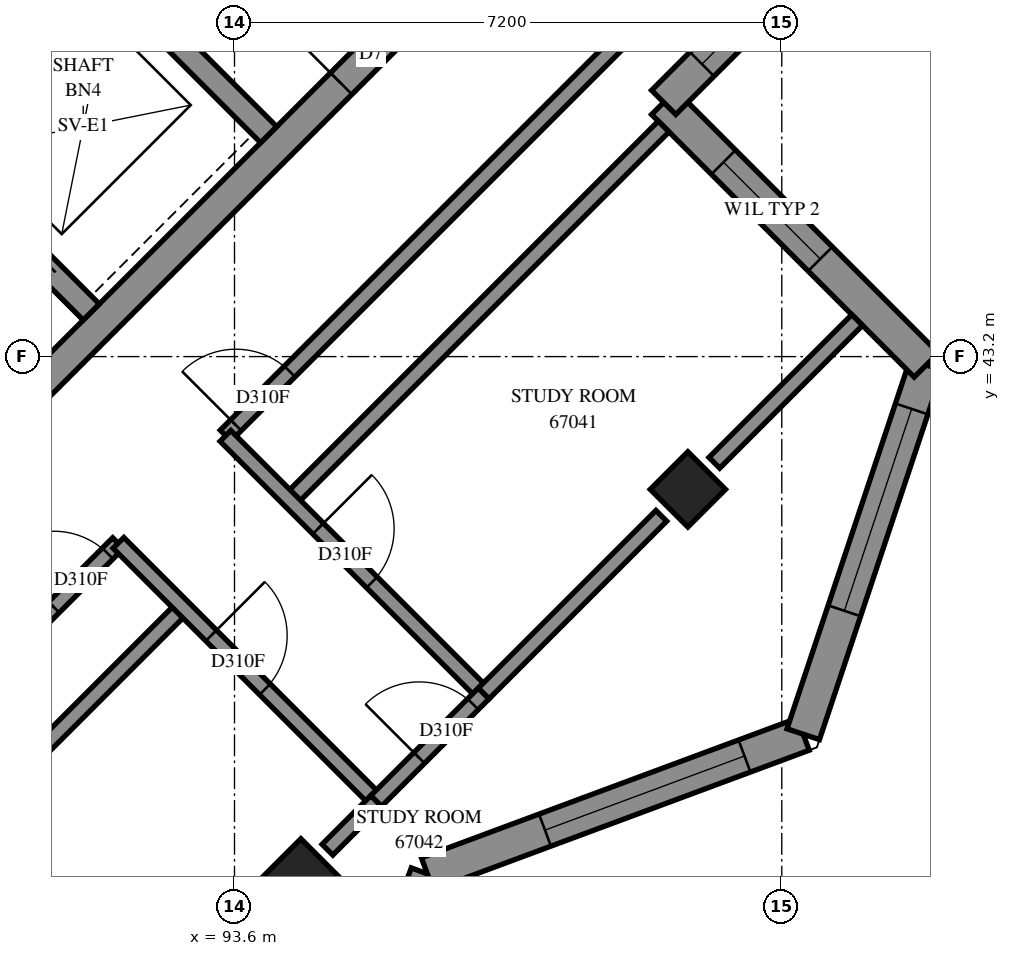
"""IFC4 building model, lengths in metres.
Left out: names, types, materials, properties, quantities, classifications, styles, units other than length and angle.
Written with IfcOpenShell. Run it as: python <this file> out.ifc"""

import sys

from ifc_helpers import new_model, si_unit, direction, frame, frame_2d, origin, origin_2d, place, context, subcontext, project, spatial, polyline, rectangle, outline, extrude, element, fill, save


model = new_model("IFC4")
c1 = context("Model", 3, precision=1e-05, world=origin(), true_north=direction((0.0, 1.0)))
c2 = subcontext(c1, "Body", "Model", "MODEL_VIEW")
j1 = project(units=[si_unit("LENGTHUNIT", "METRE"), si_unit("PLANEANGLEUNIT", "RADIAN")], contexts=[c1])
p1 = place(None, origin())
s1 = spatial("IfcSite", under=j1, at=p1, CompositionType="ELEMENT")
p2 = place(p1, origin())
s2 = spatial("IfcBuilding", under=s1, at=p2, CompositionType="ELEMENT")
p3 = place(p2, frame((0.0, 0.0, 247.2)))
s3 = spatial("IfcBuildingStorey", under=s2, at=p3, CompositionType="ELEMENT", Elevation=247.2)
for number, where, z_axis, x_axis in (
    (1, (99.565, 41.453, 0.0), (0.0, 0.0, 1.0), (0.707, -0.707, 0.0)),
    (2, (94.474, 36.362, 0.0), (0.0, 0.0, 1.0), (0.707, -0.707, 0.0)),
):
    element("IfcColumn", number, at=place(p3, frame(where, z_axis=z_axis, x_axis=x_axis)), inside=s3, PredefinedType="COLUMN", context=c2, shape_type="SweptSolid", body=[
        extrude(rectangle(XDim=0.7, YDim=0.7, at=origin_2d()), origin(), (0.0, 0.0, 1.0), 3.1),
    ])
p4 = place(p3, frame((86.978, 38.766, -0.3), z_axis=(0.0, 0.0, 1.0), x_axis=(0.7071067812, 0.7071067812, 0.0)))
e3 = element("IfcWall", 3, at=p4, inside=s3, PredefinedType="SHEAR", context=c2, shape_type="SweptSolid", body=[
    extrude(rectangle(XDim=14.4, YDim=0.4, at=frame_2d((7.2, 0.0))), origin(), (0.0, 0.0, 1.0), 2.7),
])
p5 = place(p4, frame((4.55, 0.0, 0.3)))
e4 = element("IfcOpeningElement", 4, at=p5, cuts=e3, PredefinedType="OPENING", context=c2, shape_type="SweptSolid", body=[
    extrude(rectangle(XDim=1.1, YDim=2.1, at=frame_2d((0.55, 1.05))), frame((0.0, 0.21, 0.0), z_axis=(0.0, -1.0, 0.0), x_axis=(1.0, 0.0, 0.0)), (0.0, 0.0, 1.0), 0.42),
])
p6 = place(p4, frame((11.35, 0.0, 0.3)))
e5 = element("IfcOpeningElement", 5, at=p6, cuts=e3, PredefinedType="OPENING", context=c2, shape_type="SweptSolid", body=[
    extrude(rectangle(XDim=1.1, YDim=2.1, at=frame_2d((0.55, 1.05))), frame((0.0, 0.21, 0.0), z_axis=(0.0, -1.0, 0.0), x_axis=(1.0, 0.0, 0.0)), (0.0, 0.0, 1.0), 0.42),
])
p7 = place(p3, frame((89.17, 46.332, 0.0), z_axis=(0.0, 0.0, 1.0), x_axis=(0.7071067812, 0.7071067812, 0.0)))
e6 = element("IfcWall", 6, at=p7, inside=s3, PredefinedType="SOLIDWALL", context=c2, shape_type="SweptSolid", body=[
    extrude(rectangle(XDim=3.3, YDim=0.3, at=frame_2d((1.65, 0.0))), origin(), (0.0, 0.0, 1.0), 3.1),
])
p8 = place(p3, frame((81.534, 53.969, 0.0), z_axis=(0.0, 0.0, 1.0), x_axis=(0.707103309, -0.7071102534, 0.0)))
e7 = element("IfcWall", 7, at=p8, inside=s3, PredefinedType="SOLIDWALL", context=c2, shape_type="SweptSolid", body=[
    extrude(rectangle(XDim=14.4, YDim=0.3, at=frame_2d((7.2, 0.0))), origin(), (0.0, 0.0, 1.0), 3.1),
])
p9 = place(p8, frame((8.55, 0.0, 0.0)))
e8 = element("IfcOpeningElement", 8, at=p9, cuts=e7, PredefinedType="OPENING", context=c2, shape_type="SweptSolid", body=[
    extrude(rectangle(XDim=0.9, YDim=2.1, at=frame_2d((0.45, 1.05))), frame((0.0, 0.16, 0.0), z_axis=(0.0, -1.0, 0.0), x_axis=(1.0, 0.0, 0.0)), (0.0, 0.0, 1.0), 0.32),
])
p10 = place(p8, frame((1.25, 0.0, 0.0)))
e9 = element("IfcOpeningElement", 9, at=p10, cuts=e7, PredefinedType="OPENING", context=c2, shape_type="SweptSolid", body=[
    extrude(rectangle(XDim=1.1, YDim=2.1, at=frame_2d((0.55, 1.05))), frame((0.0, 0.16, 0.0), z_axis=(0.0, -1.0, 0.0), x_axis=(1.0, 0.0, 0.0)), (0.0, 0.0, 1.0), 0.32),
])
p11 = place(p8, frame((4.85, 0.0, 0.0)))
e10 = element("IfcOpeningElement", 10, at=p11, cuts=e7, PredefinedType="OPENING", context=c2, shape_type="SweptSolid", body=[
    extrude(rectangle(XDim=1.1, YDim=2.1, at=frame_2d((0.55, 1.05))), frame((0.0, 0.16, 0.0), z_axis=(0.0, -1.0, 0.0), x_axis=(1.0, 0.0, 0.0)), (0.0, 0.0, 1.0), 0.32),
])
p12 = place(p8, frame((12.05, 0.0, 0.0)))
e11 = element("IfcOpeningElement", 11, at=p12, cuts=e7, PredefinedType="OPENING", context=c2, shape_type="SweptSolid", body=[
    extrude(rectangle(XDim=1.1, YDim=2.1, at=frame_2d((0.55, 1.05))), frame((0.0, 0.16, 0.0), z_axis=(0.0, -1.0, 0.0), x_axis=(1.0, 0.0, 0.0)), (0.0, 0.0, 1.0), 0.32),
])
p13 = place(p3, frame((88.958, 51.211, 0.0), z_axis=(0.0, 0.0, 1.0), x_axis=(0.7070998367, -0.7071137256, 0.0)))
e12 = element("IfcWall", 12, at=p13, inside=s3, PredefinedType="SOLIDWALL", context=c2, shape_type="SweptSolid", body=[
    extrude(rectangle(XDim=7.2, YDim=0.3, at=frame_2d((3.6, 0.0))), origin(), (0.0, 0.0, 1.0), 3.1),
])
p14 = place(p3, frame((94.3, 31.45, 0.0), z_axis=(0.0, 0.0, 1.0), x_axis=(0.3481927166, 0.9374229739, 0.0)))
e13 = element("IfcWall", 13, at=p14, inside=s3, PredefinedType="SOLIDWALL", context=c2, shape_type="SweptSolid", body=[
    extrude(outline(polyline([(-0.108, -0.225), (5.172, -0.225), (5.379, 0.225), (0.108, 0.225), (-0.108, -0.225)])), origin(), (0.0, 0.0, 1.0), 3.1),
])
p15 = place(p14, frame((1.534, 0.0, 0.45)))
e14 = element("IfcOpeningElement", 14, at=p15, cuts=e13, PredefinedType="OPENING", context=c2, shape_type="SweptSolid", body=[
    extrude(rectangle(XDim=2.8, YDim=2.55, at=frame_2d((1.4, 1.275))), frame((0.0, 0.235, 0.0), z_axis=(0.0, -1.0, 0.0), x_axis=(1.0, 0.0, 0.0)), (0.0, 0.0, 1.0), 0.47),
])
p16 = place(p3, frame((96.137, 36.395, 0.0), z_axis=(0.0, 0.0, 1.0), x_axis=(0.937429161, 0.3481760591, 0.0)))
e15 = element("IfcWall", 15, at=p16, inside=s3, PredefinedType="SOLIDWALL", context=c2, shape_type="SweptSolid", body=[
    extrude(outline(polyline([(0.103, -0.225), (5.383, -0.225), (5.168, 0.225), (-0.103, 0.225), (0.103, -0.225)])), origin(), (0.0, 0.0, 1.0), 3.1),
])
p17 = place(p16, frame((1.651, 0.0, 0.45)))
e16 = element("IfcOpeningElement", 16, at=p17, cuts=e15, PredefinedType="OPENING", context=c2, shape_type="SweptSolid", body=[
    extrude(rectangle(XDim=2.8, YDim=2.55, at=frame_2d((1.4, 1.275))), frame((0.0, 0.235, 0.0), z_axis=(0.0, -1.0, 0.0), x_axis=(1.0, 0.0, 0.0)), (0.0, 0.0, 1.0), 0.47),
])
p18 = place(p3, frame((101.082, 38.232, 0.0), z_axis=(0.0, 0.0, 1.0), x_axis=(0.316227766, 0.9486832981, 0.0)))
e17 = element("IfcWall", 17, at=p18, inside=s3, PredefinedType="SOLIDWALL", context=c2, shape_type="SweptSolid", body=[
    extrude(outline(polyline([(-0.108, -0.225), (5.259, -0.225), (4.981, 0.225), (0.108, 0.225), (-0.108, -0.225)])), origin(), (0.0, 0.0, 1.0), 3.1),
])
p19 = place(p18, frame((1.711, 0.0, 0.45)))
e18 = element("IfcOpeningElement", 18, at=p19, cuts=e17, PredefinedType="OPENING", context=c2, shape_type="SweptSolid", body=[
    extrude(rectangle(XDim=2.8, YDim=2.55, at=frame_2d((1.4, 1.275))), frame((0.0, 0.235, 0.0), z_axis=(0.0, -1.0, 0.0), x_axis=(1.0, 0.0, 0.0)), (0.0, 0.0, 1.0), 0.47),
])
p20 = place(p3, frame((102.701, 43.089, 0.0), z_axis=(0.0, 0.0, 1.0), x_axis=(-0.7070965479, 0.7071170144, 0.0)))
e19 = element("IfcWall", 19, at=p20, inside=s3, PredefinedType="SOLIDWALL", context=c2, shape_type="SweptSolid", body=[
    extrude(outline(polyline([(-0.139, -0.225), (4.661, -0.225), (5.111, 0.225), (0.139, 0.225), (-0.139, -0.225)])), origin(), (0.0, 0.0, 1.0), 3.1),
])
p21 = place(p20, frame((1.974, 0.0, 0.6)))
e20 = element("IfcOpeningElement", 20, at=p21, cuts=e19, PredefinedType="OPENING", context=c2, shape_type="SweptSolid", body=[
    extrude(rectangle(XDim=1.8, YDim=1.9, at=frame_2d((0.9, 0.95))), frame((0.0, 0.235, 0.0), z_axis=(0.0, -1.0, 0.0), x_axis=(1.0, 0.0, 0.0)), (0.0, 0.0, 1.0), 0.47),
])
p22 = place(p3, frame((99.246, 46.544, 0.0), z_axis=(0.0, 0.0, 1.0), x_axis=(0.7071067812, 0.7071067812, 0.0)))
e21 = element("IfcWall", 21, at=p22, inside=s3, PredefinedType="SOLIDWALL", context=c2, shape_type="SweptSolid", body=[
    extrude(outline(polyline([(0.225, -0.225), (5.955, -0.225), (5.362, 0.225), (-0.225, 0.225), (0.225, -0.225)])), origin(), (0.0, 0.0, 1.0), 3.1),
])
p23 = place(p22, frame((0.713, 0.0, 0.6)))
e22 = element("IfcOpeningElement", 22, at=p23, cuts=e21, PredefinedType="OPENING", context=c2, shape_type="SweptSolid", body=[
    extrude(rectangle(XDim=1.8, YDim=1.9, at=frame_2d((0.9, 0.95))), frame((0.0, 0.235, 0.0), z_axis=(0.0, -1.0, 0.0), x_axis=(1.0, 0.0, 0.0)), (0.0, 0.0, 1.0), 0.47),
])
p24 = place(p3, frame((84.934, 31.915, 0.0), z_axis=(0.0, 0.0, 1.0), x_axis=(0.7071067812, 0.7071067812, 0.0)))
e23 = element("IfcWall", 23, at=p24, inside=s3, PredefinedType="PARTITIONING", context=c2, shape_type="SweptSolid", body=[
    extrude(rectangle(XDim=11.29, YDim=0.2, at=frame_2d((5.645, 0.0))), origin(), (0.0, 0.0, 1.0), 3.1),
])
p25 = place(p3, frame((93.483, 42.161, 0.0), z_axis=(0.0, 0.0, 1.0), x_axis=(0.7071067812, 0.7071067812, 0.0)))
e24 = element("IfcWall", 24, at=p25, inside=s3, PredefinedType="PARTITIONING", context=c2, shape_type="SweptSolid", body=[
    extrude(rectangle(XDim=9.8, YDim=0.2, at=frame_2d((4.9, 0.0))), origin(), (0.0, 0.0, 1.0), 3.1),
])
p26 = place(p25, frame((0.193, 0.0, 0.0)))
e25 = element("IfcOpeningElement", 25, at=p26, cuts=e24, PredefinedType="OPENING", context=c2, shape_type="SweptSolid", body=[
    extrude(rectangle(XDim=1.0, YDim=2.1, at=frame_2d((0.5, 1.05))), frame((0.0, 0.11, 0.0), z_axis=(0.0, -1.0, 0.0), x_axis=(1.0, 0.0, 0.0)), (0.0, 0.0, 1.0), 0.22),
])
p27 = place(p3, frame((86.836, 35.514, 0.0), z_axis=(0.0, 0.0, 1.0), x_axis=(0.7071067812, 0.7071067812, 0.0)))
e26 = element("IfcWall", 26, at=p27, inside=s3, PredefinedType="PARTITIONING", context=c2, shape_type="SweptSolid", body=[
    extrude(rectangle(XDim=7.399, YDim=0.2, at=frame_2d((3.7, 0.0))), origin(), (0.0, 0.0, 1.0), 3.1),
])
p28 = place(p27, frame((6.207, 0.0, 0.0)))
e27 = element("IfcOpeningElement", 27, at=p28, cuts=e26, PredefinedType="OPENING", context=c2, shape_type="SweptSolid", body=[
    extrude(rectangle(XDim=1.0, YDim=2.1, at=frame_2d((0.5, 1.05))), frame((0.0, 0.11, 0.0), z_axis=(0.0, -1.0, 0.0), x_axis=(1.0, 0.0, 0.0)), (0.0, 0.0, 1.0), 0.22),
])
p29 = place(p3, frame((94.331, 41.313, 0.0), z_axis=(0.0, 0.0, 1.0), x_axis=(0.7071139756, 0.7070995867, 0.0)))
e28 = element("IfcWall", 28, at=p29, inside=s3, PredefinedType="PARTITIONING", context=c2, shape_type="SweptSolid", body=[
    extrude(rectangle(XDim=6.95, YDim=0.2, at=frame_2d((3.475, 0.0))), origin(), (0.0, 0.0, 1.0), 3.1),
])
p30 = place(p3, frame((93.481, 42.157, 0.0), z_axis=(0.0, 0.0, 1.0), x_axis=(0.7071067812, -0.7071067812, 0.0)))
e29 = element("IfcWall", 29, at=p30, inside=s3, PredefinedType="PARTITIONING", context=c2, shape_type="SweptSolid", body=[
    extrude(rectangle(XDim=4.8, YDim=0.2, at=frame_2d((2.4, 0.0))), origin(), (0.0, 0.0, 1.0), 3.1),
])
p31 = place(p30, frame((1.725, 0.0, 0.0)))
e30 = element("IfcOpeningElement", 30, at=p31, cuts=e29, PredefinedType="OPENING", context=c2, shape_type="SweptSolid", body=[
    extrude(rectangle(XDim=1.0, YDim=2.1, at=frame_2d((0.5, 1.05))), frame((0.0, 0.11, 0.0), z_axis=(0.0, -1.0, 0.0), x_axis=(1.0, 0.0, 0.0)), (0.0, 0.0, 1.0), 0.22),
])
p32 = place(p3, frame((92.073, 40.749, 0.0), z_axis=(0.0, 0.0, 1.0), x_axis=(0.7071067812, -0.7071067812, 0.0)))
e31 = element("IfcWall", 31, at=p32, inside=s3, PredefinedType="PARTITIONING", context=c2, shape_type="SweptSolid", body=[
    extrude(rectangle(XDim=4.8, YDim=0.2, at=frame_2d((2.4, 0.0))), origin(), (0.0, 0.0, 1.0), 3.1),
])
p33 = place(p32, frame((1.725, 0.0, 0.0)))
e32 = element("IfcOpeningElement", 32, at=p33, cuts=e31, PredefinedType="OPENING", context=c2, shape_type="SweptSolid", body=[
    extrude(rectangle(XDim=1.0, YDim=2.1, at=frame_2d((0.5, 1.05))), frame((0.0, 0.11, 0.0), z_axis=(0.0, -1.0, 0.0), x_axis=(1.0, 0.0, 0.0)), (0.0, 0.0, 1.0), 0.22),
])
p34 = place(p3, frame((96.877, 38.767, 0.0), z_axis=(0.0, 0.0, 1.0), x_axis=(0.7071067812, 0.7071067812, 0.0)))
e33 = element("IfcWall", 33, at=p34, inside=s3, PredefinedType="PARTITIONING", context=c2, shape_type="SweptSolid", body=[
    extrude(rectangle(XDim=3.306, YDim=0.2, at=frame_2d((1.653, 0.0))), origin(), (0.0, 0.0, 1.0), 2.6),
])
p35 = place(p3, frame((99.913, 41.803, 0.0), z_axis=(0.0, 0.0, 1.0), x_axis=(0.7071067812, 0.7071067812, 0.0)))
e34 = element("IfcWall", 34, at=p35, inside=s3, PredefinedType="PARTITIONING", context=c2, shape_type="SweptSolid", body=[
    extrude(rectangle(XDim=2.656, YDim=0.2, at=frame_2d((1.328, 0.0))), origin(), (0.0, 0.0, 1.0), 3.1),
])
p36 = place(p3, frame((95.463, 37.353, 0.0), z_axis=(0.0, 0.0, 1.0), x_axis=(0.7071067812, 0.7071067812, 0.0)))
e35 = element("IfcWall", 35, at=p36, inside=s3, PredefinedType="PARTITIONING", context=c2, shape_type="SweptSolid", body=[
    extrude(rectangle(XDim=2.0, YDim=0.2, at=frame_2d((1.0, 0.0))), origin(), (0.0, 0.0, 1.0), 2.6),
])
p37 = place(p36, frame((0.802, 0.0, 0.0)))
e36 = element("IfcOpeningElement", 36, at=p37, cuts=e35, PredefinedType="OPENING", context=c2, shape_type="SweptSolid", body=[
    extrude(rectangle(XDim=1.0, YDim=2.1, at=frame_2d((0.5, 1.05))), frame((0.0, 0.11, 0.0), z_axis=(0.0, -1.0, 0.0), x_axis=(1.0, 0.0, 0.0)), (0.0, 0.0, 1.0), 0.22),
])
p38 = place(p3, frame((94.823, 36.713, 0.0), z_axis=(0.0, 0.0, 1.0), x_axis=(0.7071067812, 0.7071067812, 0.0)))
e37 = element("IfcWall", 37, at=p38, inside=s3, PredefinedType="PARTITIONING", context=c2, shape_type="SweptSolid", body=[
    extrude(rectangle(XDim=0.905, YDim=0.2, at=frame_2d((0.453, 0.0))), origin(), (0.0, 0.0, 1.0), 2.6),
])
p39 = place(p17, origin())
e38 = element("IfcWindow", 38, at=p39, inside=s3, PartitioningType="SINGLE_PANEL", PredefinedType="WINDOW", context=c2, shape_type="SweptSolid", body=[
    extrude(rectangle(XDim=2.8, YDim=2.55, at=frame_2d((1.4, 1.275))), frame((0.0, 0.205, 0.0), z_axis=(0.0, -1.0, 0.0), x_axis=(1.0, 0.0, 0.0)), (0.0, 0.0, 1.0), 0.06),
])
fill(e16, e38)
p40 = place(p19, origin())
e39 = element("IfcWindow", 39, at=p40, inside=s3, PartitioningType="SINGLE_PANEL", PredefinedType="WINDOW", context=c2, shape_type="SweptSolid", body=[
    extrude(rectangle(XDim=2.8, YDim=2.55, at=frame_2d((1.4, 1.275))), frame((0.0, 0.205, 0.0), z_axis=(0.0, -1.0, 0.0), x_axis=(1.0, 0.0, 0.0)), (0.0, 0.0, 1.0), 0.06),
])
fill(e18, e39)
p41 = place(p21, origin())
e40 = element("IfcWindow", 40, at=p41, inside=s3, PartitioningType="SINGLE_PANEL", PredefinedType="WINDOW", context=c2, shape_type="SweptSolid", body=[
    extrude(rectangle(XDim=1.8, YDim=1.9, at=frame_2d((0.9, 0.95))), frame((0.0, 0.205, 0.0), z_axis=(0.0, -1.0, 0.0), x_axis=(1.0, 0.0, 0.0)), (0.0, 0.0, 1.0), 0.06),
])
fill(e20, e40)
p42 = place(p23, origin())
e41 = element("IfcWindow", 41, at=p42, inside=s3, PartitioningType="SINGLE_PANEL", PredefinedType="WINDOW", context=c2, shape_type="SweptSolid", body=[
    extrude(rectangle(XDim=1.8, YDim=1.9, at=frame_2d((0.9, 0.95))), frame((0.0, 0.205, 0.0), z_axis=(0.0, -1.0, 0.0), x_axis=(1.0, 0.0, 0.0)), (0.0, 0.0, 1.0), 0.06),
])
fill(e22, e41)
p43 = place(p6, origin())
e42 = element("IfcDoor", 42, at=p43, inside=s3, OperationType="SINGLE_SWING_RIGHT", PredefinedType="DOOR", context=c2, shape_type="SweptSolid", body=[
    extrude(rectangle(XDim=1.1, YDim=2.1, at=frame_2d((0.55, 1.05))), frame((0.0, 0.025, 0.0), z_axis=(0.0, -1.0, 0.0), x_axis=(1.0, 0.0, 0.0)), (0.0, 0.0, 1.0), 0.05),
])
fill(e5, e42)
p44 = place(p28, origin())
e43 = element("IfcDoor", 43, at=p44, inside=s3, OperationType="SINGLE_SWING_RIGHT", PredefinedType="DOOR", context=c2, shape_type="SweptSolid", body=[
    extrude(rectangle(XDim=1.0, YDim=2.1, at=frame_2d((0.5, 1.05))), frame((0.0, 0.025, 0.0), z_axis=(0.0, -1.0, 0.0), x_axis=(1.0, 0.0, 0.0)), (0.0, 0.0, 1.0), 0.05),
])
fill(e27, e43)
p45 = place(p33, origin())
e44 = element("IfcDoor", 44, at=p45, inside=s3, OperationType="SINGLE_SWING_LEFT", PredefinedType="DOOR", context=c2, shape_type="SweptSolid", body=[
    extrude(rectangle(XDim=1.0, YDim=2.1, at=frame_2d((0.5, 1.05))), frame((0.0, 0.025, 0.0), z_axis=(0.0, -1.0, 0.0), x_axis=(1.0, 0.0, 0.0)), (0.0, 0.0, 1.0), 0.05),
])
fill(e32, e44)
p46 = place(p26, origin())
e45 = element("IfcDoor", 45, at=p46, inside=s3, OperationType="SINGLE_SWING_LEFT", PredefinedType="DOOR", context=c2, shape_type="SweptSolid", body=[
    extrude(rectangle(XDim=1.0, YDim=2.1, at=frame_2d((0.5, 1.05))), frame((0.0, 0.025, 0.0), z_axis=(0.0, -1.0, 0.0), x_axis=(1.0, 0.0, 0.0)), (0.0, 0.0, 1.0), 0.05),
])
fill(e25, e45)
p47 = place(p31, origin())
e46 = element("IfcDoor", 46, at=p47, inside=s3, OperationType="SINGLE_SWING_RIGHT", PredefinedType="DOOR", context=c2, shape_type="SweptSolid", body=[
    extrude(rectangle(XDim=1.0, YDim=2.1, at=frame_2d((0.5, 1.05))), frame((0.0, 0.025, 0.0), z_axis=(0.0, -1.0, 0.0), x_axis=(1.0, 0.0, 0.0)), (0.0, 0.0, 1.0), 0.05),
])
fill(e30, e46)
p48 = place(p37, origin())
e47 = element("IfcDoor", 47, at=p48, inside=s3, OperationType="SINGLE_SWING_RIGHT", PredefinedType="DOOR", context=c2, shape_type="SweptSolid", body=[
    extrude(rectangle(XDim=1.0, YDim=2.1, at=frame_2d((0.5, 1.05))), frame((0.0, 0.025, 0.0), z_axis=(0.0, -1.0, 0.0), x_axis=(1.0, 0.0, 0.0)), (0.0, 0.0, 1.0), 0.05),
])
fill(e36, e47)
save(model, sys.argv[1])
